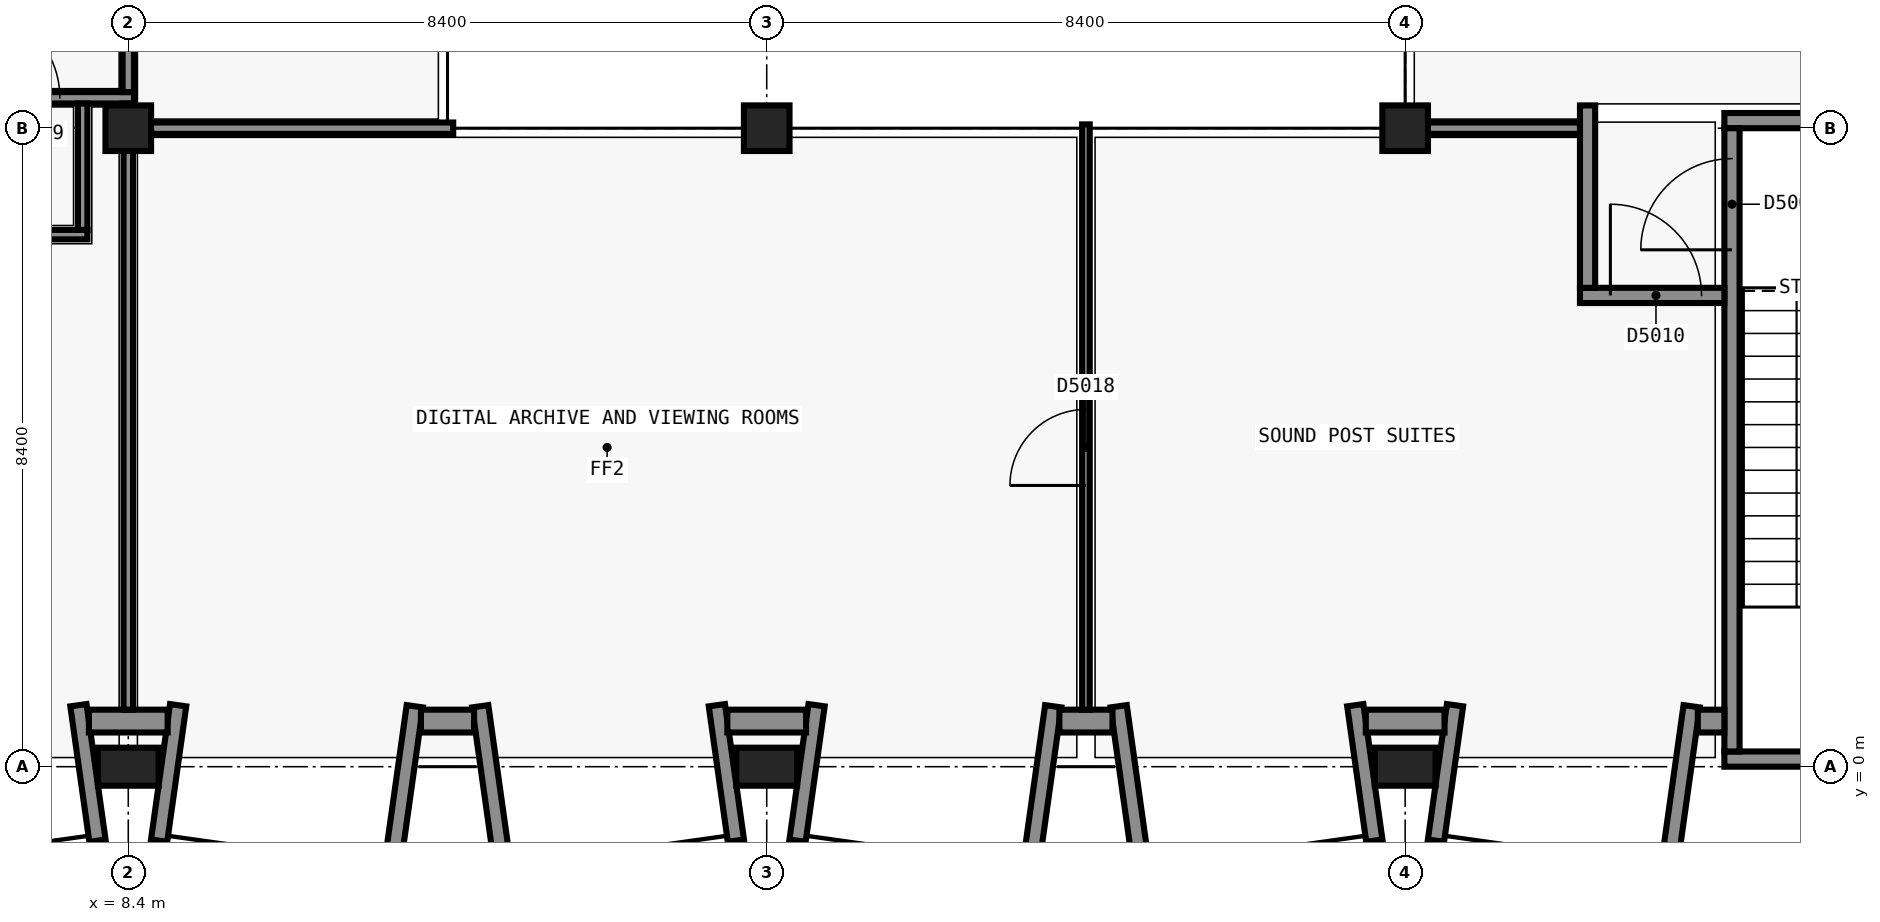
"""IFC4 building model, lengths in metres.
Left out: names, types, materials, properties, quantities, classifications, styles, units other than length and angle.
Written with IfcOpenShell. Run it as: python <this file> out.ifc"""

import sys

from ifc_helpers import new_model, si_unit, direction, frame, frame_2d, origin, origin_2d, place, context, subcontext, project, spatial, rectangle, extrude, element, fill, save


model = new_model("IFC4")
c1 = context("Model", 3, precision=1e-05, world=origin(), true_north=direction((0.0, 1.0)))
c2 = subcontext(c1, "Body", "Model", "MODEL_VIEW")
j1 = project(units=[si_unit("LENGTHUNIT", "METRE"), si_unit("PLANEANGLEUNIT", "RADIAN")], contexts=[c1])
p1 = place(None, origin())
s1 = spatial("IfcSite", under=j1, at=p1, CompositionType="ELEMENT")
p2 = place(p1, origin())
s2 = spatial("IfcBuilding", under=s1, at=p2, CompositionType="ELEMENT")
p3 = place(p2, frame((0.0, 0.0, 24.6)))
s3 = spatial("IfcBuildingStorey", under=s2, at=p3, CompositionType="ELEMENT", Elevation=24.6)
p4 = place(p3, frame((33.6, 0.1, 0.0), z_axis=(0.0, 0.0, 1.0), x_axis=(-1.0, 0.0, 0.0)))
e1 = element("IfcWall", 1, at=p4, inside=s3, PredefinedType="SHEAR", context=c2, shape_type="SweptSolid", body=[
    extrude(rectangle(XDim=4.2, YDim=0.2, at=frame_2d((2.1, 0.0))), origin(), (0.0, 0.0, 1.0), 4.5),
])
p5 = place(p3, frame((29.4, 8.5, 0.0), z_axis=(0.0, 0.0, 1.0), x_axis=(1.0, 0.0, 0.0)))
e2 = element("IfcWall", 2, at=p5, inside=s3, PredefinedType="SHEAR", context=c2, shape_type="SweptSolid", body=[
    extrude(rectangle(XDim=4.2, YDim=0.2, at=frame_2d((2.1, 0.0))), origin(), (0.0, 0.0, 1.0), 4.5),
])
p6 = place(p5, frame((1.5, 0.0, 0.0)))
e3 = element("IfcOpeningElement", 3, at=p6, cuts=e2, PredefinedType="OPENING", context=c2, shape_type="SweptSolid", body=[
    extrude(rectangle(XDim=1.2, YDim=2.1, at=frame_2d((0.6, 1.05))), frame((0.0, 0.11, 0.0), z_axis=(0.0, -1.0, 0.0), x_axis=(1.0, 0.0, 0.0)), (0.0, 0.0, 1.0), 0.22),
])
p7 = place(p3, frame((29.5, 0.2, 0.0), z_axis=(0.0, 0.0, 1.0), x_axis=(0.0, 1.0, 0.0)))
e4 = element("IfcWall", 4, at=p7, inside=s3, PredefinedType="SHEAR", context=c2, shape_type="SweptSolid", body=[
    extrude(rectangle(XDim=8.2, YDim=0.2, at=frame_2d((4.1, 0.0))), origin(), (0.0, 0.0, 1.0), 4.5),
])
p8 = place(p7, frame((6.6, 0.0, 0.0)))
e5 = element("IfcOpeningElement", 5, at=p8, cuts=e4, PredefinedType="OPENING", context=c2, shape_type="SweptSolid", body=[
    extrude(rectangle(XDim=1.2, YDim=2.1, at=frame_2d((0.6, 1.05))), frame((0.0, 0.11, 0.0), z_axis=(0.0, -1.0, 0.0), x_axis=(1.0, 0.0, 0.0)), (0.0, 0.0, 1.0), 0.22),
])
p9 = place(p3, frame((8.4, 0.0, 0.0), z_axis=(0.0, 0.0, 1.0), x_axis=(1.0, 0.0, 0.0)))
e6 = element("IfcColumn", 6, at=p9, inside=s3, PredefinedType="COLUMN", context=c2, shape_type="SweptSolid", body=[
    extrude(rectangle(XDim=0.8, YDim=0.5, at=origin_2d()), origin(), (0.0, 0.0, 1.0), 4.5),
])
p10 = place(p3, frame((8.4, 8.4, 0.0), z_axis=(0.0, 0.0, 1.0), x_axis=(1.0, 0.0, 0.0)))
e7 = element("IfcColumn", 7, at=p10, inside=s3, PredefinedType="COLUMN", context=c2, shape_type="SweptSolid", body=[
    extrude(rectangle(XDim=0.6, YDim=0.6, at=origin_2d()), origin(), (0.0, 0.0, 1.0), 4.5),
])
p11 = place(p3, frame((16.8, 0.0, 0.0), z_axis=(0.0, 0.0, 1.0), x_axis=(1.0, 0.0, 0.0)))
e8 = element("IfcColumn", 8, at=p11, inside=s3, PredefinedType="COLUMN", context=c2, shape_type="SweptSolid", body=[
    extrude(rectangle(XDim=0.8, YDim=0.5, at=origin_2d()), origin(), (0.0, 0.0, 1.0), 4.5),
])
p12 = place(p3, frame((16.8, 8.4, 0.0), z_axis=(0.0, 0.0, 1.0), x_axis=(1.0, 0.0, 0.0)))
e9 = element("IfcColumn", 9, at=p12, inside=s3, PredefinedType="COLUMN", context=c2, shape_type="SweptSolid", body=[
    extrude(rectangle(XDim=0.6, YDim=0.6, at=origin_2d()), origin(), (0.0, 0.0, 1.0), 4.5),
])
p13 = place(p3, frame((25.2, 0.0, 0.0), z_axis=(0.0, 0.0, 1.0), x_axis=(1.0, 0.0, 0.0)))
e10 = element("IfcColumn", 10, at=p13, inside=s3, PredefinedType="COLUMN", context=c2, shape_type="SweptSolid", body=[
    extrude(rectangle(XDim=0.8, YDim=0.5, at=origin_2d()), origin(), (0.0, 0.0, 1.0), 4.5),
])
p14 = place(p3, frame((25.2, 8.4, 0.0), z_axis=(0.0, 0.0, 1.0), x_axis=(1.0, 0.0, 0.0)))
e11 = element("IfcColumn", 11, at=p14, inside=s3, PredefinedType="COLUMN", context=c2, shape_type="SweptSolid", body=[
    extrude(rectangle(XDim=0.6, YDim=0.6, at=origin_2d()), origin(), (0.0, 0.0, 1.0), 4.5),
])
for number, where, z_axis, x_axis in (
    (12, (7.744, 0.809, 0.0), (0.0, 0.0, 1.0), (0.139, -0.99, 0.0)),
    (13, (9.056, 0.809, 0.0), (0.0, 0.0, 1.0), (-0.139, -0.99, 0.0)),
):
    element("IfcWall", number, at=place(p3, frame(where, z_axis=z_axis, x_axis=x_axis)), inside=s3, PredefinedType="SOLIDWALL", context=c2, shape_type="SweptSolid", body=[
        extrude(rectangle(XDim=1.8, YDim=0.215, at=frame_2d((0.9, 0.0))), origin(), (0.0, 0.0, 1.0), 4.2),
    ])
p15 = place(p3, frame((12.169, 0.795, 0.0), z_axis=(0.0, 0.0, 1.0), x_axis=(-0.139141913905, -0.990272451295, 0.0)))
e14 = element("IfcWall", 14, at=p15, inside=s3, PredefinedType="SOLIDWALL", context=c2, shape_type="SweptSolid", body=[
    extrude(rectangle(XDim=2.219, YDim=0.215, at=frame_2d((1.11, 0.0))), origin(), (0.0, 0.0, 1.0), 4.2),
])
p16 = place(p3, frame((13.031, 0.795, 0.0), z_axis=(0.0, 0.0, 1.0), x_axis=(0.139249775508, -0.99025728981, 0.0)))
e15 = element("IfcWall", 15, at=p16, inside=s3, PredefinedType="SOLIDWALL", context=c2, shape_type="SweptSolid", body=[
    extrude(rectangle(XDim=2.22, YDim=0.215, at=frame_2d((1.11, 0.0))), origin(), (0.0, 0.0, 1.0), 4.2),
])
for number, where, z_axis, x_axis in (
    (16, (16.144, 0.809, 0.0), (0.0, 0.0, 1.0), (0.139, -0.99, 0.0)),
    (17, (17.456, 0.809, 0.0), (0.0, 0.0, 1.0), (-0.139, -0.99, 0.0)),
):
    element("IfcWall", number, at=place(p3, frame(where, z_axis=z_axis, x_axis=x_axis)), inside=s3, PredefinedType="SOLIDWALL", context=c2, shape_type="SweptSolid", body=[
        extrude(rectangle(XDim=1.8, YDim=0.215, at=frame_2d((0.9, 0.0))), origin(), (0.0, 0.0, 1.0), 4.2),
    ])
for number, where, z_axis, x_axis in (
    (18, (20.569, 0.795, 0.0), (0.0, 0.0, 1.0), (-0.139, -0.99, 0.0)),
    (19, (21.431, 0.795, 0.0), (0.0, 0.0, 1.0), (0.139, -0.99, 0.0)),
):
    element("IfcWall", number, at=place(p3, frame(where, z_axis=z_axis, x_axis=x_axis)), inside=s3, PredefinedType="SOLIDWALL", context=c2, shape_type="SweptSolid", body=[
        extrude(rectangle(XDim=2.219, YDim=0.215, at=frame_2d((1.11, 0.0))), origin(), (0.0, 0.0, 1.0), 4.2),
    ])
for number, where, z_axis, x_axis in (
    (20, (24.544, 0.809, 0.0), (0.0, 0.0, 1.0), (0.139, -0.99, 0.0)),
    (21, (25.856, 0.809, 0.0), (0.0, 0.0, 1.0), (-0.139, -0.99, 0.0)),
):
    element("IfcWall", number, at=place(p3, frame(where, z_axis=z_axis, x_axis=x_axis)), inside=s3, PredefinedType="SOLIDWALL", context=c2, shape_type="SweptSolid", body=[
        extrude(rectangle(XDim=1.8, YDim=0.215, at=frame_2d((0.9, 0.0))), origin(), (0.0, 0.0, 1.0), 4.2),
    ])
p17 = place(p3, frame((28.969, 0.795, 0.0), z_axis=(0.0, 0.0, 1.0), x_axis=(-0.139249775508, -0.99025728981, 0.0)))
e22 = element("IfcWall", 22, at=p17, inside=s3, PredefinedType="SOLIDWALL", context=c2, shape_type="SweptSolid", body=[
    extrude(rectangle(XDim=2.22, YDim=0.215, at=frame_2d((1.11, 0.0))), origin(), (0.0, 0.0, 1.0), 4.2),
])
p18 = place(p3, frame((8.918, 0.6, 0.0), z_axis=(0.0, 0.0, 1.0), x_axis=(-1.0, 0.0, 0.0)))
e23 = element("IfcWall", 23, at=p18, inside=s3, PredefinedType="SOLIDWALL", context=c2, shape_type="SweptSolid", body=[
    extrude(rectangle(XDim=1.036, YDim=0.3, at=frame_2d((0.518, 0.0))), origin(), (0.0, 0.0, 1.0), 4.2),
])
p19 = place(p3, frame((12.949, 0.6, 0.0), z_axis=(0.0, 0.0, 1.0), x_axis=(-1.0, 0.0, 0.0)))
e24 = element("IfcWall", 24, at=p19, inside=s3, PredefinedType="SOLIDWALL", context=c2, shape_type="SweptSolid", body=[
    extrude(rectangle(XDim=0.699, YDim=0.3, at=frame_2d((0.35, 0.0))), origin(), (0.0, 0.0, 1.0), 4.2),
])
p20 = place(p3, frame((17.318, 0.6, 0.0), z_axis=(0.0, 0.0, 1.0), x_axis=(-1.0, 0.0, 0.0)))
e25 = element("IfcWall", 25, at=p20, inside=s3, PredefinedType="SOLIDWALL", context=c2, shape_type="SweptSolid", body=[
    extrude(rectangle(XDim=1.036, YDim=0.3, at=frame_2d((0.518, 0.0))), origin(), (0.0, 0.0, 1.0), 4.2),
])
p21 = place(p3, frame((21.35, 0.6, 0.0), z_axis=(0.0, 0.0, 1.0), x_axis=(-1.0, 0.0, 0.0)))
e26 = element("IfcWall", 26, at=p21, inside=s3, PredefinedType="SOLIDWALL", context=c2, shape_type="SweptSolid", body=[
    extrude(rectangle(XDim=0.699, YDim=0.3, at=frame_2d((0.35, 0.0))), origin(), (0.0, 0.0, 1.0), 4.2),
])
p22 = place(p3, frame((25.718, 0.6, 0.0), z_axis=(0.0, 0.0, 1.0), x_axis=(-1.0, 0.0, 0.0)))
e27 = element("IfcWall", 27, at=p22, inside=s3, PredefinedType="SOLIDWALL", context=c2, shape_type="SweptSolid", body=[
    extrude(rectangle(XDim=1.036, YDim=0.3, at=frame_2d((0.518, 0.0))), origin(), (0.0, 0.0, 1.0), 4.2),
])
p23 = place(p3, frame((29.4, 0.6, 0.0), z_axis=(0.0, 0.0, 1.0), x_axis=(-1.0, 0.0, 0.0)))
e28 = element("IfcWall", 28, at=p23, inside=s3, PredefinedType="SOLIDWALL", context=c2, shape_type="SweptSolid", body=[
    extrude(rectangle(XDim=0.349, YDim=0.3, at=frame_2d((0.175, 0.0))), origin(), (0.0, 0.0, 1.0), 4.2),
])
p24 = place(p3, frame((27.5, 6.2, 0.0), z_axis=(0.0, 0.0, 1.0), x_axis=(1.0, 0.0, 0.0)))
e29 = element("IfcWall", 29, at=p24, inside=s3, PredefinedType="SOLIDWALL", context=c2, shape_type="SweptSolid", body=[
    extrude(rectangle(XDim=1.9, YDim=0.2, at=frame_2d((0.95, 0.0))), origin(), (0.0, 0.0, 1.0), 4.2),
])
p25 = place(p24, frame((0.4, 0.0, 0.0)))
e30 = element("IfcOpeningElement", 30, at=p25, cuts=e29, PredefinedType="OPENING", context=c2, shape_type="SweptSolid", body=[
    extrude(rectangle(XDim=1.2, YDim=2.1, at=frame_2d((0.6, 1.05))), frame((0.0, 0.11, 0.0), z_axis=(0.0, -1.0, 0.0), x_axis=(1.0, 0.0, 0.0)), (0.0, 0.0, 1.0), 0.22),
])
p26 = place(p3, frame((27.6, 6.3, 0.0), z_axis=(0.0, 0.0, 1.0), x_axis=(0.0, 1.0, 0.0)))
e31 = element("IfcWall", 31, at=p26, inside=s3, PredefinedType="SOLIDWALL", context=c2, shape_type="SweptSolid", body=[
    extrude(rectangle(XDim=2.4, YDim=0.2, at=frame_2d((1.2, 0.0))), origin(), (0.0, 0.0, 1.0), 3.7),
])
p27 = place(p3, frame((8.325, 8.4, 0.0), z_axis=(0.0, 0.0, 1.0), x_axis=(1.0, 0.0, 0.0)))
e32 = element("IfcWall", 32, at=p27, inside=s3, PredefinedType="PARTITIONING", context=c2, shape_type="SweptSolid", body=[
    extrude(rectangle(XDim=4.35, YDim=0.15, at=frame_2d((2.175, 0.0))), origin(), (0.0, 0.0, 1.0), 3.5),
])
p28 = place(p3, frame((25.125, 8.4, 0.0), z_axis=(0.0, 0.0, 1.0), x_axis=(1.0, 0.0, 0.0)))
e33 = element("IfcWall", 33, at=p28, inside=s3, PredefinedType="PARTITIONING", context=c2, shape_type="SweptSolid", body=[
    extrude(rectangle(XDim=2.375, YDim=0.15, at=frame_2d((1.188, 0.0))), origin(), (0.0, 0.0, 1.0), 3.5),
])
p29 = place(p3, frame((6.1, 8.8, 0.0), z_axis=(0.0, 0.0, 1.0), x_axis=(1.0, 0.0, 0.0)))
e34 = element("IfcWall", 34, at=p29, inside=s3, PredefinedType="SOLIDWALL", context=c2, shape_type="SweptSolid", body=[
    extrude(rectangle(XDim=2.375, YDim=0.15, at=frame_2d((1.188, 0.0))), origin(), (0.0, 0.0, 1.0), 3.5),
])
p30 = place(p29, frame((0.2, 0.0, 0.0)))
e35 = element("IfcOpeningElement", 35, at=p30, cuts=e34, PredefinedType="OPENING", context=c2, shape_type="SweptSolid", body=[
    extrude(rectangle(XDim=1.2, YDim=2.1, at=frame_2d((0.6, 1.05))), frame((0.0, 0.085, 0.0), z_axis=(0.0, -1.0, 0.0), x_axis=(1.0, 0.0, 0.0)), (0.0, 0.0, 1.0), 0.17),
])
p31 = place(p3, frame((8.4, 8.475, 0.0), z_axis=(0.0, 0.0, 1.0), x_axis=(0.0, 1.0, 0.0)))
e36 = element("IfcWall", 36, at=p31, inside=s3, PredefinedType="PARTITIONING", context=c2, shape_type="SweptSolid", body=[
    extrude(rectangle(XDim=0.25, YDim=0.15, at=frame_2d((0.125, 0.0))), origin(), (0.0, 0.0, 1.0), 3.5),
])
p32 = place(p3, frame((8.4, 8.875, 0.0), z_axis=(0.0, 0.0, 1.0), x_axis=(0.0, 1.0, 0.0)))
e37 = element("IfcWall", 37, at=p32, inside=s3, PredefinedType="SOLIDWALL", context=c2, shape_type="SweptSolid", body=[
    extrude(rectangle(XDim=2.85, YDim=0.15, at=frame_2d((1.425, 0.0))), origin(), (0.0, 0.0, 1.0), 3.5),
])
p33 = place(p32, frame((0.825, 0.0, 0.0)))
e38 = element("IfcOpeningElement", 38, at=p33, cuts=e37, PredefinedType="OPENING", context=c2, shape_type="SweptSolid", body=[
    extrude(rectangle(XDim=1.2, YDim=2.1, at=frame_2d((0.6, 1.05))), frame((0.0, 0.085, 0.0), z_axis=(0.0, -1.0, 0.0), x_axis=(1.0, 0.0, 0.0)), (0.0, 0.0, 1.0), 0.17),
])
p34 = place(p3, frame((6.1, 7.0, 0.0), z_axis=(0.0, 0.0, 1.0), x_axis=(1.0, 0.0, 0.0)))
e39 = element("IfcWall", 39, at=p34, inside=s3, PredefinedType="PARTITIONING", context=c2, shape_type="SweptSolid", body=[
    extrude(rectangle(XDim=1.762, YDim=0.125, at=frame_2d((0.881, 0.0))), origin(), (0.0, 0.0, 1.0), 4.2),
])
p35 = place(p3, frame((7.8, 7.062, 0.0), z_axis=(0.0, 0.0, 1.0), x_axis=(0.0, 1.0, 0.0)))
e40 = element("IfcWall", 40, at=p35, inside=s3, PredefinedType="PARTITIONING", context=c2, shape_type="SweptSolid", body=[
    extrude(rectangle(XDim=1.663, YDim=0.125, at=frame_2d((0.831, 0.0))), origin(), (0.0, 0.0, 1.0), 3.7),
])
p36 = place(p3, frame((8.4, 0.75, 0.0), z_axis=(0.0, 0.0, 1.0), x_axis=(0.0, 1.0, 0.0)))
e41 = element("IfcWall", 41, at=p36, inside=s3, PredefinedType="PARTITIONING", context=c2, shape_type="SweptSolid", body=[
    extrude(rectangle(XDim=7.575, YDim=0.125, at=frame_2d((3.788, 0.0))), origin(), (0.0, 0.0, 1.0), 3.5),
])
p37 = place(p3, frame((21.0, 0.75, 0.0), z_axis=(0.0, 0.0, 1.0), x_axis=(0.0, 1.0, 0.0)))
e42 = element("IfcWall", 42, at=p37, inside=s3, PredefinedType="PARTITIONING", context=c2, shape_type="SweptSolid", body=[
    extrude(rectangle(XDim=7.7, YDim=0.1, at=frame_2d((3.85, 0.0))), origin(), (0.0, 0.0, 1.0), 3.5),
])
p38 = place(p37, frame((2.95, 0.0, 0.0)))
e43 = element("IfcOpeningElement", 43, at=p38, cuts=e42, PredefinedType="OPENING", context=c2, shape_type="SweptSolid", body=[
    extrude(rectangle(XDim=1.0, YDim=2.1, at=frame_2d((0.5, 1.05))), frame((0.0, 0.06, 0.0), z_axis=(0.0, -1.0, 0.0), x_axis=(1.0, 0.0, 0.0)), (0.0, 0.0, 1.0), 0.12),
])
p39 = place(p8, origin())
e44 = element("IfcDoor", 44, at=p39, inside=s3, OperationType="SINGLE_SWING_RIGHT", PredefinedType="DOOR", context=c2, shape_type="SweptSolid", body=[
    extrude(rectangle(XDim=1.2, YDim=2.1, at=frame_2d((0.6, 1.05))), frame((0.0, 0.025, 0.0), z_axis=(0.0, -1.0, 0.0), x_axis=(1.0, 0.0, 0.0)), (0.0, 0.0, 1.0), 0.05),
])
fill(e5, e44)
p40 = place(p25, origin())
e45 = element("IfcDoor", 45, at=p40, inside=s3, OperationType="SINGLE_SWING_RIGHT", PredefinedType="DOOR", context=c2, shape_type="SweptSolid", body=[
    extrude(rectangle(XDim=1.2, YDim=2.1, at=frame_2d((0.6, 1.05))), frame((0.0, 0.025, 0.0), z_axis=(0.0, -1.0, 0.0), x_axis=(1.0, 0.0, 0.0)), (0.0, 0.0, 1.0), 0.05),
])
fill(e30, e45)
p41 = place(p38, origin())
e46 = element("IfcDoor", 46, at=p41, inside=s3, OperationType="SINGLE_SWING_RIGHT", PredefinedType="DOOR", context=c2, shape_type="SweptSolid", body=[
    extrude(rectangle(XDim=1.0, YDim=2.1, at=frame_2d((0.5, 1.05))), frame((0.0, 0.025, 0.0), z_axis=(0.0, -1.0, 0.0), x_axis=(1.0, 0.0, 0.0)), (0.0, 0.0, 1.0), 0.05),
])
fill(e43, e46)
p42 = place(p30, origin())
e47 = element("IfcDoor", 47, at=p42, inside=s3, OperationType="SINGLE_SWING_RIGHT", PredefinedType="DOOR", context=c2, shape_type="SweptSolid", body=[
    extrude(rectangle(XDim=1.2, YDim=2.1, at=frame_2d((0.6, 1.05))), frame((0.0, 0.025, 0.0), z_axis=(0.0, -1.0, 0.0), x_axis=(1.0, 0.0, 0.0)), (0.0, 0.0, 1.0), 0.05),
])
fill(e35, e47)
save(model, sys.argv[1])
